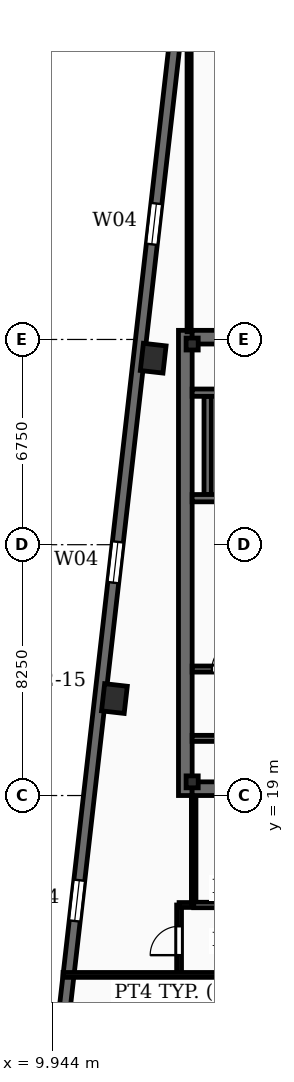
"""IFC4 building model, lengths in metres.
Left out: names, types, materials, properties, quantities, classifications, styles, units other than length and angle.
Written with IfcOpenShell. Run it as: python <this file> out.ifc"""

import sys

from ifc_helpers import new_model, si_unit, direction, frame, frame_2d, origin, origin_2d, place, context, subcontext, project, spatial, rectangle, i_section, extrude, element, fill, save


model = new_model("IFC4")
c1 = context("Model", 3, precision=1e-05, world=origin(), true_north=direction((0.0, 1.0)))
c2 = subcontext(c1, "Body", "Model", "MODEL_VIEW")
j1 = project(units=[si_unit("LENGTHUNIT", "METRE"), si_unit("PLANEANGLEUNIT", "RADIAN")], contexts=[c1])
p1 = place(None, origin())
s1 = spatial("IfcSite", under=j1, at=p1, CompositionType="ELEMENT")
p2 = place(p1, origin())
s2 = spatial("IfcBuilding", under=s1, at=p2, CompositionType="ELEMENT")
p3 = place(p2, frame((0.0, 0.0, 232.2)))
s3 = spatial("IfcBuildingStorey", under=s2, at=p3, CompositionType="ELEMENT", Elevation=232.2)
p4 = place(p3, frame((14.325, 19.0, -0.27), z_axis=(0.0, 0.0, 1.0), x_axis=(0.0, 1.0, 0.0)))
e1 = element("IfcWall", 1, at=p4, inside=s3, PredefinedType="SHEAR", context=c2, shape_type="SweptSolid", body=[
    extrude(rectangle(XDim=15.3, YDim=0.45, at=frame_2d((7.65, 0.0))), origin(), (0.0, 0.0, 1.0), 3.75),
])
for number, where, z_axis, x_axis in (
    (2, (14.55, 19.225, -0.27), (0.0, 0.0, 1.0), (1.0, 0.0, 0.0)),
    (3, (14.55, 34.075, -0.27), (0.0, 0.0, 1.0), (1.0, 0.0, 0.0)),
):
    element("IfcWall", number, at=place(p3, frame(where, z_axis=z_axis, x_axis=x_axis)), inside=s3, PredefinedType="SHEAR", context=c2, shape_type="SweptSolid", body=[
        extrude(rectangle(XDim=9.8, YDim=0.45, at=frame_2d((4.9, 0.0))), origin(), (0.0, 0.0, 1.0), 3.75),
    ])
for number, where, z_axis, x_axis in (
    (4, (14.55, 19.45, -0.27), (0.0, 0.0, 1.0), (1.0, 0.0, 0.0)),
    (5, (14.55, 33.85, -0.27), (0.0, 0.0, 1.0), (1.0, 0.0, 0.0)),
):
    element("IfcColumn", number, at=place(p3, frame(where, z_axis=z_axis, x_axis=x_axis)), inside=s3, PredefinedType="COLUMN", context=c2, shape_type="SweptSolid", body=[
        extrude(i_section(OverallWidth=0.399, OverallDepth=0.393, WebThickness=0.023, FlangeThickness=0.037, FilletRadius=0.02, at=origin_2d()), origin(), (0.0, 0.0, 1.0), 3.75),
    ])
for number, where, z_axis, x_axis in (
    (6, (13.269, 33.384, -0.27), (0.0, 0.0, 1.0), (0.113, 0.994, 0.0)),
    (7, (11.993, 22.189, -0.27), (0.0, 0.0, 1.0), (0.113, 0.994, 0.0)),
):
    element("IfcColumn", number, at=place(p3, frame(where, z_axis=z_axis, x_axis=x_axis)), inside=s3, PredefinedType="COLUMN", context=c2, shape_type="SweptSolid", body=[
        extrude(rectangle(XDim=0.9, YDim=0.75, at=origin_2d()), origin(), (0.0, 0.0, 1.0), 3.75),
    ])
p5 = place(p3, frame((10.211, 10.701, 0.0), z_axis=(0.0, 0.0, 1.0), x_axis=(0.113203107947, 0.993571867733, 0.0)))
e8 = element("IfcWall", 8, at=p5, inside=s3, PredefinedType="SOLIDWALL", context=c2, shape_type="SweptSolid", body=[
    extrude(rectangle(XDim=34.5, YDim=0.36, at=frame_2d((17.25, 0.0))), origin(), (0.0, 0.0, 1.0), 3.48),
])
p6 = place(p5, frame((4.2, 0.0, 0.88)))
e9 = element("IfcOpeningElement", 9, at=p6, cuts=e8, PredefinedType="OPENING", context=c2, shape_type="SweptSolid", body=[
    extrude(rectangle(XDim=1.35, YDim=2.2, at=frame_2d((0.675, 1.1))), frame((0.0, 0.19, 0.0), z_axis=(0.0, -1.0, 0.0), x_axis=(1.0, 0.0, 0.0)), (0.0, 0.0, 1.0), 0.38),
])
p7 = place(p5, frame((15.4, 0.0, 0.88)))
e10 = element("IfcOpeningElement", 10, at=p7, cuts=e8, PredefinedType="OPENING", context=c2, shape_type="SweptSolid", body=[
    extrude(rectangle(XDim=1.35, YDim=2.2, at=frame_2d((0.675, 1.1))), frame((0.0, 0.19, 0.0), z_axis=(0.0, -1.0, 0.0), x_axis=(1.0, 0.0, 0.0)), (0.0, 0.0, 1.0), 0.38),
])
p8 = place(p5, frame((26.6, 0.0, 0.88)))
e11 = element("IfcOpeningElement", 11, at=p8, cuts=e8, PredefinedType="OPENING", context=c2, shape_type="SweptSolid", body=[
    extrude(rectangle(XDim=1.35, YDim=2.2, at=frame_2d((0.675, 1.1))), frame((0.0, 0.19, 0.0), z_axis=(0.0, -1.0, 0.0), x_axis=(1.0, 0.0, 0.0)), (0.0, 0.0, 1.0), 0.38),
])
p9 = place(p3, frame((24.35, 28.78, 0.0), z_axis=(0.0, 0.0, 1.0), x_axis=(-1.0, 0.0, 0.0)))
e12 = element("IfcWall", 12, at=p9, inside=s3, PredefinedType="SOLIDWALL", context=c2, shape_type="SweptSolid", body=[
    extrude(rectangle(XDim=9.8, YDim=0.24, at=frame_2d((4.9, 0.0))), origin(), (0.0, 0.0, 1.0), 3.48),
])
p10 = place(p9, frame((7.83, 0.0, 0.0)))
e13 = element("IfcOpeningElement", 13, at=p10, cuts=e12, PredefinedType="OPENING", context=c2, shape_type="SweptSolid", body=[
    extrude(rectangle(XDim=1.1, YDim=2.15, at=frame_2d((0.55, 1.075))), frame((0.0, 0.13, 0.0), z_axis=(0.0, -1.0, 0.0), x_axis=(1.0, 0.0, 0.0)), (0.0, 0.0, 1.0), 0.26),
])
p11 = place(p3, frame((14.55, 32.25, 0.0), z_axis=(0.0, 0.0, 1.0), x_axis=(1.0, 0.0, 0.0)))
e14 = element("IfcWall", 14, at=p11, inside=s3, PredefinedType="SOLIDWALL", context=c2, shape_type="SweptSolid", body=[
    extrude(rectangle(XDim=9.8, YDim=0.24, at=frame_2d((4.9, 0.0))), origin(), (0.0, 0.0, 1.0), 3.48),
])
p12 = place(p3, frame((15.06, 28.9, 0.0), z_axis=(0.0, 0.0, 1.0), x_axis=(0.0, 1.0, 0.0)))
e15 = element("IfcWall", 15, at=p12, inside=s3, PredefinedType="SOLIDWALL", context=c2, shape_type="SweptSolid", body=[
    extrude(rectangle(XDim=3.23, YDim=0.24, at=frame_2d((1.615, 0.0))), origin(), (0.0, 0.0, 1.0), 3.48),
])
p13 = place(p3, frame((14.55, 20.88, 0.0), z_axis=(0.0, 0.0, 1.0), x_axis=(1.0, 0.0, 0.0)))
e16 = element("IfcWall", 16, at=p13, inside=s3, PredefinedType="SOLIDWALL", context=c2, shape_type="SweptSolid", body=[
    extrude(rectangle(XDim=9.8, YDim=0.2, at=frame_2d((4.9, 0.0))), origin(), (0.0, 0.0, 1.0), 2.54),
])
p14 = place(p13, frame((3.4, 0.0, 0.0)))
e17 = element("IfcOpeningElement", 17, at=p14, cuts=e16, PredefinedType="OPENING", context=c2, shape_type="SweptSolid", body=[
    extrude(rectangle(XDim=1.05, YDim=2.15, at=frame_2d((0.525, 1.075))), frame((0.0, 0.11, 0.0), z_axis=(0.0, -1.0, 0.0), x_axis=(1.0, 0.0, 0.0)), (0.0, 0.0, 1.0), 0.22),
])
p15 = place(p3, frame((14.55, 23.16, 0.0), z_axis=(0.0, 0.0, 1.0), x_axis=(1.0, 0.0, 0.0)))
e18 = element("IfcWall", 18, at=p15, inside=s3, PredefinedType="SOLIDWALL", context=c2, shape_type="SweptSolid", body=[
    extrude(rectangle(XDim=3.82, YDim=0.2, at=frame_2d((1.91, 0.0))), origin(), (0.0, 0.0, 1.0), 2.54),
])
p16 = place(p15, frame((0.65, 0.0, 0.0)))
e19 = element("IfcOpeningElement", 19, at=p16, cuts=e18, PredefinedType="OPENING", context=c2, shape_type="SweptSolid", body=[
    extrude(rectangle(XDim=0.86, YDim=2.05, at=frame_2d((0.43, 1.025))), frame((0.0, 0.11, 0.0), z_axis=(0.0, -1.0, 0.0), x_axis=(1.0, 0.0, 0.0)), (0.0, 0.0, 1.0), 0.22),
])
p17 = place(p3, frame((14.6, 15.4, 0.0), z_axis=(0.0, 0.0, 1.0), x_axis=(1.0, 0.0, 0.0)))
e20 = element("IfcWall", 20, at=p17, inside=s3, PredefinedType="PARTITIONING", context=c2, shape_type="SweptSolid", body=[
    extrude(rectangle(XDim=9.9, YDim=0.18, at=frame_2d((4.95, 0.0))), origin(), (0.0, 0.0, 1.0), 2.54),
])
p18 = place(p17, frame((0.79, 0.0, 0.0)))
e21 = element("IfcOpeningElement", 21, at=p18, cuts=e20, PredefinedType="OPENING", context=c2, shape_type="SweptSolid", body=[
    extrude(rectangle(XDim=0.92, YDim=2.1, at=frame_2d((0.46, 1.05))), frame((0.0, 0.1, 0.0), z_axis=(0.0, -1.0, 0.0), x_axis=(1.0, 0.0, 0.0)), (0.0, 0.0, 1.0), 0.2),
])
p19 = place(p17, frame((3.29, 0.0, 0.0)))
e22 = element("IfcOpeningElement", 22, at=p19, cuts=e20, PredefinedType="OPENING", context=c2, shape_type="SweptSolid", body=[
    extrude(rectangle(XDim=0.92, YDim=2.1, at=frame_2d((0.46, 1.05))), frame((0.0, 0.1, 0.0), z_axis=(0.0, -1.0, 0.0), x_axis=(1.0, 0.0, 0.0)), (0.0, 0.0, 1.0), 0.2),
])
p20 = place(p17, frame((5.79, 0.0, 0.0)))
e23 = element("IfcOpeningElement", 23, at=p20, cuts=e20, PredefinedType="OPENING", context=c2, shape_type="SweptSolid", body=[
    extrude(rectangle(XDim=0.92, YDim=2.1, at=frame_2d((0.46, 1.05))), frame((0.0, 0.1, 0.0), z_axis=(0.0, -1.0, 0.0), x_axis=(1.0, 0.0, 0.0)), (0.0, 0.0, 1.0), 0.2),
])
p21 = place(p17, frame((8.24, 0.0, 0.0)))
e24 = element("IfcOpeningElement", 24, at=p21, cuts=e20, PredefinedType="OPENING", context=c2, shape_type="SweptSolid", body=[
    extrude(rectangle(XDim=0.92, YDim=2.1, at=frame_2d((0.46, 1.05))), frame((0.0, 0.1, 0.0), z_axis=(0.0, -1.0, 0.0), x_axis=(1.0, 0.0, 0.0)), (0.0, 0.0, 1.0), 0.2),
])
p22 = place(p3, frame((14.6, 15.4, 0.0), z_axis=(0.0, 0.0, 1.0), x_axis=(0.0, 1.0, 0.0)))
e25 = element("IfcWall", 25, at=p22, inside=s3, PredefinedType="PARTITIONING", context=c2, shape_type="SweptSolid", body=[
    extrude(rectangle(XDim=3.58, YDim=0.15, at=frame_2d((1.79, 0.0))), origin(), (0.0, 0.0, 1.0), 2.54),
])
p23 = place(p3, frame((10.303, 13.1, 0.0), z_axis=(0.0, 0.0, 1.0), x_axis=(1.0, 0.0, 0.0)))
e26 = element("IfcWall", 26, at=p23, inside=s3, PredefinedType="PARTITIONING", context=c2, shape_type="SweptSolid", body=[
    extrude(rectangle(XDim=57.973, YDim=0.16, at=frame_2d((28.986, 0.0))), origin(), (0.0, 0.0, 1.0), 2.54),
])
p24 = place(p23, frame((8.922, 0.0, 0.0)))
e27 = element("IfcOpeningElement", 27, at=p24, cuts=e26, PredefinedType="OPENING", context=c2, shape_type="SweptSolid", body=[
    extrude(rectangle(XDim=0.95, YDim=2.15, at=frame_2d((0.475, 1.075))), frame((0.0, 0.09, 0.0), z_axis=(0.0, -1.0, 0.0), x_axis=(1.0, 0.0, 0.0)), (0.0, 0.0, 1.0), 0.18),
])
p25 = place(p23, frame((17.222, 0.0, 0.0)))
e28 = element("IfcOpeningElement", 28, at=p25, cuts=e26, PredefinedType="OPENING", context=c2, shape_type="SweptSolid", body=[
    extrude(rectangle(XDim=0.95, YDim=2.15, at=frame_2d((0.475, 1.075))), frame((0.0, 0.09, 0.0), z_axis=(0.0, -1.0, 0.0), x_axis=(1.0, 0.0, 0.0)), (0.0, 0.0, 1.0), 0.18),
])
p26 = place(p23, frame((24.222, 0.0, 0.0)))
e29 = element("IfcOpeningElement", 29, at=p26, cuts=e26, PredefinedType="OPENING", context=c2, shape_type="SweptSolid", body=[
    extrude(rectangle(XDim=0.95, YDim=2.15, at=frame_2d((0.475, 1.075))), frame((0.0, 0.09, 0.0), z_axis=(0.0, -1.0, 0.0), x_axis=(1.0, 0.0, 0.0)), (0.0, 0.0, 1.0), 0.18),
])
p27 = place(p23, frame((31.222, 0.0, 0.0)))
e30 = element("IfcOpeningElement", 30, at=p27, cuts=e26, PredefinedType="OPENING", context=c2, shape_type="SweptSolid", body=[
    extrude(rectangle(XDim=0.95, YDim=2.15, at=frame_2d((0.475, 1.075))), frame((0.0, 0.09, 0.0), z_axis=(0.0, -1.0, 0.0), x_axis=(1.0, 0.0, 0.0)), (0.0, 0.0, 1.0), 0.18),
])
p28 = place(p23, frame((37.972, 0.0, 0.0)))
e31 = element("IfcOpeningElement", 31, at=p28, cuts=e26, PredefinedType="OPENING", context=c2, shape_type="SweptSolid", body=[
    extrude(rectangle(XDim=0.95, YDim=2.15, at=frame_2d((0.475, 1.075))), frame((0.0, 0.09, 0.0), z_axis=(0.0, -1.0, 0.0), x_axis=(1.0, 0.0, 0.0)), (0.0, 0.0, 1.0), 0.18),
])
p29 = place(p23, frame((45.222, 0.0, 0.0)))
e32 = element("IfcOpeningElement", 32, at=p29, cuts=e26, PredefinedType="OPENING", context=c2, shape_type="SweptSolid", body=[
    extrude(rectangle(XDim=0.95, YDim=2.15, at=frame_2d((0.475, 1.075))), frame((0.0, 0.09, 0.0), z_axis=(0.0, -1.0, 0.0), x_axis=(1.0, 0.0, 0.0)), (0.0, 0.0, 1.0), 0.18),
])
p30 = place(p3, frame((14.45, 34.25, 0.0), z_axis=(0.0, 0.0, 1.0), x_axis=(0.0, 1.0, 0.0)))
e33 = element("IfcWall", 33, at=p30, inside=s3, PredefinedType="PARTITIONING", context=c2, shape_type="SweptSolid", body=[
    extrude(rectangle(XDim=11.562, YDim=0.135, at=frame_2d((5.781, 0.0))), origin(), (0.0, 0.0, 1.0), 2.54),
])
p31 = place(p3, frame((14.12, 13.1, 0.0), z_axis=(0.0, 0.0, 1.0), x_axis=(0.0, 1.0, 0.0)))
e34 = element("IfcWall", 34, at=p31, inside=s3, PredefinedType="PARTITIONING", context=c2, shape_type="SweptSolid", body=[
    extrude(rectangle(XDim=2.3, YDim=0.16, at=frame_2d((1.15, 0.0))), origin(), (0.0, 0.0, 1.0), 2.54),
])
p32 = place(p31, frame((0.65, 0.0, 0.0)))
e35 = element("IfcOpeningElement", 35, at=p32, cuts=e34, PredefinedType="OPENING", context=c2, shape_type="SweptSolid", body=[
    extrude(rectangle(XDim=0.95, YDim=2.15, at=frame_2d((0.475, 1.075))), frame((0.0, 0.09, 0.0), z_axis=(0.0, -1.0, 0.0), x_axis=(1.0, 0.0, 0.0)), (0.0, 0.0, 1.0), 0.18),
])
p33 = place(p3, frame((14.12, 15.4, 0.0), z_axis=(0.0, 0.0, 1.0), x_axis=(1.0, 0.0, 0.0)))
e36 = element("IfcWall", 36, at=p33, inside=s3, PredefinedType="PARTITIONING", context=c2, shape_type="SweptSolid", body=[
    extrude(rectangle(XDim=0.5, YDim=0.16, at=frame_2d((0.25, 0.0))), origin(), (0.0, 0.0, 1.0), 2.54),
])
p34 = place(p6, origin())
e37 = element("IfcWindow", 37, at=p34, inside=s3, PartitioningType="SINGLE_PANEL", PredefinedType="WINDOW", context=c2, shape_type="SweptSolid", body=[
    extrude(rectangle(XDim=1.35, YDim=2.2, at=frame_2d((0.675, 1.1))), frame((0.0, 0.03, 0.0), z_axis=(0.0, -1.0, 0.0), x_axis=(1.0, 0.0, 0.0)), (0.0, 0.0, 1.0), 0.06),
])
fill(e9, e37)
p35 = place(p7, origin())
e38 = element("IfcWindow", 38, at=p35, inside=s3, PartitioningType="SINGLE_PANEL", PredefinedType="WINDOW", context=c2, shape_type="SweptSolid", body=[
    extrude(rectangle(XDim=1.35, YDim=2.2, at=frame_2d((0.675, 1.1))), frame((0.0, 0.03, 0.0), z_axis=(0.0, -1.0, 0.0), x_axis=(1.0, 0.0, 0.0)), (0.0, 0.0, 1.0), 0.06),
])
fill(e10, e38)
p36 = place(p8, origin())
e39 = element("IfcWindow", 39, at=p36, inside=s3, PartitioningType="SINGLE_PANEL", PredefinedType="WINDOW", context=c2, shape_type="SweptSolid", body=[
    extrude(rectangle(XDim=1.35, YDim=2.2, at=frame_2d((0.675, 1.1))), frame((0.0, 0.03, 0.0), z_axis=(0.0, -1.0, 0.0), x_axis=(1.0, 0.0, 0.0)), (0.0, 0.0, 1.0), 0.06),
])
fill(e11, e39)
p37 = place(p16, origin())
e40 = element("IfcDoor", 40, at=p37, inside=s3, OperationType="SINGLE_SWING_RIGHT", PredefinedType="DOOR", context=c2, shape_type="SweptSolid", body=[
    extrude(rectangle(XDim=0.86, YDim=2.05, at=frame_2d((0.43, 1.025))), frame((0.0, 0.025, 0.0), z_axis=(0.0, -1.0, 0.0), x_axis=(1.0, 0.0, 0.0)), (0.0, 0.0, 1.0), 0.05),
])
fill(e19, e40)
p38 = place(p32, origin())
e41 = element("IfcDoor", 41, at=p38, inside=s3, OperationType="SINGLE_SWING_LEFT", PredefinedType="DOOR", context=c2, shape_type="SweptSolid", body=[
    extrude(rectangle(XDim=0.95, YDim=2.15, at=frame_2d((0.475, 1.075))), frame((0.0, 0.025, 0.0), z_axis=(0.0, -1.0, 0.0), x_axis=(1.0, 0.0, 0.0)), (0.0, 0.0, 1.0), 0.05),
])
fill(e35, e41)
save(model, sys.argv[1])
